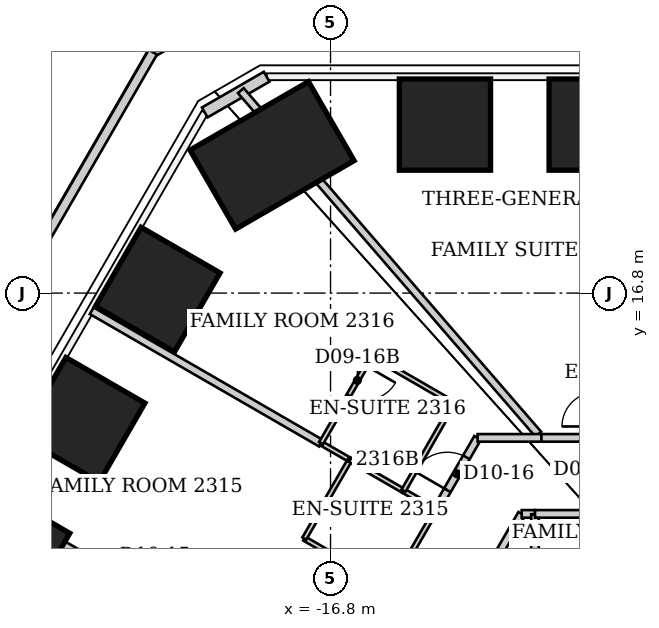
"""IFC4 building model, lengths in metres.
Left out: names, types, materials, properties, quantities, classifications, styles, units other than length and angle.
Written with IfcOpenShell. Run it as: python <this file> out.ifc"""

import sys

from ifc_helpers import new_model, si_unit, direction, frame, frame_2d, origin, origin_2d, place, context, subcontext, project, spatial, rectangle, extrude, clip, halfspace, element, fill, save


model = new_model("IFC4")
c1 = context("Model", 3, precision=1e-05, world=origin(), true_north=direction((0.0, 1.0)))
c2 = subcontext(c1, "Body", "Model", "MODEL_VIEW")
j1 = project(units=[si_unit("LENGTHUNIT", "METRE"), si_unit("PLANEANGLEUNIT", "RADIAN")], contexts=[c1])
p1 = place(None, origin())
s1 = spatial("IfcSite", under=j1, at=p1, CompositionType="ELEMENT")
p2 = place(p1, origin())
s2 = spatial("IfcBuilding", under=s1, at=p2, CompositionType="ELEMENT")
p3 = place(p2, frame((0.0, 0.0, 96.8)))
s3 = spatial("IfcBuildingStorey", under=s2, at=p3, CompositionType="ELEMENT", Elevation=96.8)
p4 = place(p3, frame((-13.79, 21.234, -0.073), z_axis=(0.0, 0.0, 1.0), x_axis=(0.0, 1.0, 0.0)))
e1 = element("IfcColumn", 1, at=p4, inside=s3, PredefinedType="COLUMN", context=c2, shape_type="SweptSolid", body=[
    clip(extrude(rectangle(XDim=2.4, YDim=2.4, at=origin_2d()), origin(), (0.0, 0.0, 1.0), 3.873), halfspace(frame((0.0, 0.0, 0.073)), True)),
])
p5 = place(p3, frame((-9.85, 21.234, -0.064), z_axis=(0.0, 0.0, 1.0), x_axis=(0.0, 1.0, 0.0)))
e2 = element("IfcColumn", 2, at=p5, inside=s3, PredefinedType="COLUMN", context=c2, shape_type="SweptSolid", body=[
    clip(extrude(rectangle(XDim=2.4, YDim=2.4, at=origin_2d()), origin(), (0.0, 0.0, 1.0), 3.865), halfspace(frame((0.0, 0.0, 0.064)), True)),
])
p6 = place(p3, frame((-25.302, 10.041, -0.063), z_axis=(0.0, 0.0, 1.0), x_axis=(-0.866025403784, 0.5, 0.0)))
e3 = element("IfcColumn", 3, at=p6, inside=s3, PredefinedType="COLUMN", context=c2, shape_type="SweptSolid", body=[
    clip(extrude(rectangle(XDim=2.4, YDim=2.4, at=origin_2d()), origin(), (0.0, 0.0, 1.0), 3.863), halfspace(frame((0.0, 0.0, 0.063)), True)),
])
p7 = place(p3, frame((-23.324, 13.466, -0.055), z_axis=(0.0, 0.0, 1.0), x_axis=(-0.866025403784, 0.5, 0.0)))
e4 = element("IfcColumn", 4, at=p7, inside=s3, PredefinedType="COLUMN", context=c2, shape_type="SweptSolid", body=[
    clip(extrude(rectangle(XDim=2.4, YDim=2.4, at=origin_2d()), origin(), (0.0, 0.0, 1.0), 3.855), halfspace(frame((0.0, 0.0, 0.055)), True)),
])
p8 = place(p3, frame((-21.346, 16.891, -0.063), z_axis=(0.0, 0.0, 1.0), x_axis=(-0.866025403784, 0.5, 0.0)))
e5 = element("IfcColumn", 5, at=p8, inside=s3, PredefinedType="COLUMN", context=c2, shape_type="SweptSolid", body=[
    clip(extrude(rectangle(XDim=2.4, YDim=2.4, at=origin_2d()), origin(), (0.0, 0.0, 1.0), 3.863), halfspace(frame((0.0, 0.0, 0.063)), True)),
])
p9 = place(p3, frame((-18.339, 20.424, -0.074), z_axis=(0.0, 0.0, 1.0), x_axis=(-0.5, 0.866025403784, 0.0)))
e6 = element("IfcColumn", 6, at=p9, inside=s3, PredefinedType="COLUMN", context=c2, shape_type="SweptSolid", body=[
    clip(extrude(rectangle(XDim=2.4, YDim=3.6, at=origin_2d()), origin(), (0.0, 0.0, 1.0), 3.874), halfspace(frame((0.0, 0.0, 0.074)), True)),
])
p10 = place(p3, frame((-20.11, 21.554, 0.0), z_axis=(0.0, 0.0, 1.0), x_axis=(0.865988793993, 0.500063404658, 0.0)))
e7 = element("IfcWall", 7, at=p10, inside=s3, PredefinedType="SOLIDWALL", context=c2, shape_type="SweptSolid", body=[
    extrude(rectangle(XDim=1.88, YDim=0.3, at=frame_2d((0.94, 0.0))), origin(), (0.0, 0.0, 1.0), 3.64),
])
p11 = place(p3, frame((-19.75, 24.133, 0.0), z_axis=(0.0, 0.0, 1.0), x_axis=(-0.866479413317, -0.499212806625, 0.0)))
e8 = element("IfcWall", 8, at=p11, inside=s3, PredefinedType="PARAPET", context=c2, shape_type="SweptSolid", body=[
    extrude(rectangle(XDim=1.991, YDim=0.25, at=frame_2d((0.996, 0.0))), origin(), (0.0, 0.0, 1.0), 1.1),
])
p12 = place(p3, frame((-21.475, 23.139, 0.0), z_axis=(0.0, 0.0, 1.0), x_axis=(-0.499999656836, -0.86602560191, 0.0)))
e9 = element("IfcWall", 9, at=p12, inside=s3, PredefinedType="PARAPET", context=c2, shape_type="SweptSolid", body=[
    extrude(rectangle(XDim=18.602, YDim=0.25, at=frame_2d((9.301, 0.0))), origin(), (0.0, 0.0, 1.0), 1.1),
])
p13 = place(p3, frame((-23.084, 16.335, 0.0), z_axis=(0.0, 0.0, 1.0), x_axis=(0.865889693368, -0.500234983702, 0.0)))
e10 = element("IfcWall", 10, at=p13, inside=s3, PredefinedType="PARTITIONING", context=c2, shape_type="SweptSolid", body=[
    extrude(rectangle(XDim=6.968, YDim=0.2, at=frame_2d((3.484, 0.0))), origin(), (0.0, 0.0, 1.0), 3.64),
])
p14 = place(p3, frame((-17.49, 10.34, 0.0), z_axis=(0.0, 0.0, 1.0), x_axis=(0.866114241029, -0.499846097802, 0.0)))
e11 = element("IfcWall", 11, at=p14, inside=s3, PredefinedType="PARTITIONING", context=c2, shape_type="SweptSolid", body=[
    extrude(rectangle(XDim=2.621, YDim=0.12, at=frame_2d((1.311, 0.0))), origin(), (0.0, 0.0, 1.0), 3.64),
])
p15 = place(p14, frame((1.421, 0.0, 0.0)))
e12 = element("IfcOpeningElement", 12, at=p15, cuts=e11, PredefinedType="OPENING", context=c2, shape_type="SweptSolid", body=[
    extrude(rectangle(XDim=0.9, YDim=2.03, at=frame_2d((0.45, 1.015))), frame((0.0, 0.06, 0.0), z_axis=(0.0, -1.0, 0.0), x_axis=(1.0, 0.0, 0.0)), (0.0, 0.0, 1.0), 0.12),
])
p16 = place(p3, frame((-17.051, 12.849, 0.0), z_axis=(0.0, 0.0, 1.0), x_axis=(0.865838315616, -0.500323906295, 0.0)))
e13 = element("IfcWall", 13, at=p16, inside=s3, PredefinedType="PARTITIONING", context=c2, shape_type="SweptSolid", body=[
    extrude(rectangle(XDim=0.878, YDim=0.12, at=frame_2d((0.439, 0.0))), origin(), (0.0, 0.0, 1.0), 3.64),
])
p17 = place(p3, frame((-16.88, 6.16, 0.0), z_axis=(0.0, 0.0, 1.0), x_axis=(-0.86594745947, 0.500134979218, 0.0)))
e14 = element("IfcWall", 14, at=p17, inside=s3, PredefinedType="PARTITIONING", context=c2, shape_type="SweptSolid", body=[
    extrude(rectangle(XDim=10.467, YDim=0.2, at=frame_2d((5.234, 0.0))), origin(), (0.0, 0.0, 1.0), 3.64),
])
p18 = place(p17, frame((4.734, 0.0, 0.0)))
e15 = element("IfcOpeningElement", 15, at=p18, cuts=e14, PredefinedType="OPENING", context=c2, shape_type="SweptSolid", body=[
    extrude(rectangle(XDim=1.0, YDim=2.13, at=frame_2d((0.5, 1.065))), frame((0.0, 0.1, 0.0), z_axis=(0.0, -1.0, 0.0), x_axis=(1.0, 0.0, 0.0)), (0.0, 0.0, 1.0), 0.2),
])
p19 = place(p3, frame((-16.29, 12.41, 0.0), z_axis=(0.0, 0.0, 1.0), x_axis=(-0.501547039172, -0.865130376012, 0.0)))
e16 = element("IfcWall", 16, at=p19, inside=s3, PredefinedType="PARTITIONING", context=c2, shape_type="SweptSolid", body=[
    extrude(rectangle(XDim=2.393, YDim=0.12, at=frame_2d((1.196, 0.0))), origin(), (0.0, 0.0, 1.0), 3.64),
])
p20 = place(p3, frame((-16.29, 12.41, 0.0), z_axis=(0.0, 0.0, 1.0), x_axis=(0.866138091645, -0.499804768086, 0.0)))
e17 = element("IfcWall", 17, at=p20, inside=s3, PredefinedType="PARTITIONING", context=c2, shape_type="SweptSolid", body=[
    extrude(rectangle(XDim=1.626, YDim=0.12, at=frame_2d((0.813, 0.0))), origin(), (0.0, 0.0, 1.0), 3.64),
])
p21 = place(p3, frame((-15.98, 3.7, 0.0), z_axis=(0.0, 0.0, 1.0), x_axis=(0.500093981358, 0.865971136822, 0.0)))
e18 = element("IfcWall", 18, at=p21, inside=s3, PredefinedType="PARTITIONING", context=c2, shape_type="SweptSolid", body=[
    extrude(rectangle(XDim=8.418, YDim=0.2, at=frame_2d((4.209, 0.0))), origin(), (0.0, 0.0, 1.0), 3.64),
])
p22 = place(p3, frame((-15.72, 15.15, 0.0), z_axis=(0.0, 0.0, 1.0), x_axis=(-0.500605174168, -0.865675724273, 0.0)))
e19 = element("IfcWall", 19, at=p22, inside=s3, PredefinedType="PARTITIONING", context=c2, shape_type="SweptSolid", body=[
    extrude(rectangle(XDim=2.657, YDim=0.12, at=frame_2d((1.329, 0.0))), origin(), (0.0, 0.0, 1.0), 3.64),
])
p23 = place(p22, frame((0.3, 0.0, 0.0)))
e20 = element("IfcOpeningElement", 20, at=p23, cuts=e19, PredefinedType="OPENING", context=c2, shape_type="SweptSolid", body=[
    extrude(rectangle(XDim=0.9, YDim=2.03, at=frame_2d((0.45, 1.015))), frame((0.0, 0.06, 0.0), z_axis=(0.0, -1.0, 0.0), x_axis=(1.0, 0.0, 0.0)), (0.0, 0.0, 1.0), 0.12),
])
p24 = place(p3, frame((-15.22, 9.03, 0.0), z_axis=(0.0, 0.0, 1.0), x_axis=(0.501502765098, 0.865156041763, 0.0)))
e21 = element("IfcWall", 21, at=p24, inside=s3, PredefinedType="PARTITIONING", context=c2, shape_type="SweptSolid", body=[
    extrude(rectangle(XDim=2.393, YDim=0.12, at=frame_2d((1.196, 0.0))), origin(), (0.0, 0.0, 1.0), 3.64),
])
p25 = place(p3, frame((-14.882, 11.597, 0.0), z_axis=(0.0, 0.0, 1.0), x_axis=(0.866181499781, -0.499729536286, 0.0)))
e22 = element("IfcWall", 22, at=p25, inside=s3, PredefinedType="PARTITIONING", context=c2, shape_type="SweptSolid", body=[
    extrude(rectangle(XDim=0.995, YDim=0.12, at=frame_2d((0.497, 0.0))), origin(), (0.0, 0.0, 1.0), 3.64),
])
p26 = place(p3, frame((-14.88, 11.6, 0.0), z_axis=(0.0, 0.0, 1.0), x_axis=(0.497704656183, 0.867346571569, 0.0)))
e23 = element("IfcWall", 23, at=p26, inside=s3, PredefinedType="PARTITIONING", context=c2, shape_type="SweptSolid", body=[
    extrude(rectangle(XDim=2.652, YDim=0.12, at=frame_2d((1.326, 0.0))), origin(), (0.0, 0.0, 1.0), 3.64),
])
p27 = place(p3, frame((-14.02, 11.1, 0.0), z_axis=(0.0, 0.0, 1.0), x_axis=(0.499641723021, 0.866232156305, 0.0)))
e24 = element("IfcWall", 24, at=p27, inside=s3, PredefinedType="PARTITIONING", context=c2, shape_type="SweptSolid", body=[
    extrude(rectangle(XDim=2.182, YDim=0.2, at=frame_2d((1.091, 0.0))), origin(), (0.0, 0.0, 1.0), 3.64),
])
p28 = place(p27, frame((0.591, 0.0, 0.0)))
e25 = element("IfcOpeningElement", 25, at=p28, cuts=e24, PredefinedType="OPENING", context=c2, shape_type="SweptSolid", body=[
    extrude(rectangle(XDim=1.0, YDim=2.13, at=frame_2d((0.5, 1.065))), frame((0.0, 0.1, 0.0), z_axis=(0.0, -1.0, 0.0), x_axis=(1.0, 0.0, 0.0)), (0.0, 0.0, 1.0), 0.2),
])
p29 = place(p3, frame((-13.56, 13.9, 0.0), z_axis=(0.0, 0.0, 1.0), x_axis=(-0.865508881864, 0.500893576935, 0.0)))
e26 = element("IfcWall", 26, at=p29, inside=s3, PredefinedType="PARTITIONING", context=c2, shape_type="SweptSolid", body=[
    extrude(rectangle(XDim=2.496, YDim=0.12, at=frame_2d((1.248, 0.0))), origin(), (0.0, 0.0, 1.0), 3.64),
])
p30 = place(p3, frame((-11.77, 10.99, 0.0), z_axis=(0.0, 0.0, 1.0), x_axis=(1.0, 0.0, 0.0)))
e27 = element("IfcWall", 27, at=p30, inside=s3, PredefinedType="PARTITIONING", context=c2, shape_type="SweptSolid", body=[
    extrude(rectangle(XDim=0.35, YDim=0.2, at=frame_2d((0.175, 0.0))), origin(), (0.0, 0.0, 1.0), 3.64),
])
p31 = place(p3, frame((-11.42, 10.98, 0.0), z_axis=(0.0, 0.0, 1.0), x_axis=(0.0, -1.0, 0.0)))
e28 = element("IfcWall", 28, at=p31, inside=s3, PredefinedType="PARTITIONING", context=c2, shape_type="SweptSolid", body=[
    extrude(rectangle(XDim=14.995, YDim=0.2, at=frame_2d((7.498, 0.0))), origin(), (0.0, 0.0, 1.0), 3.64),
])
p32 = place(p3, frame((-11.42, 10.99, 0.0), z_axis=(0.0, 0.0, 1.0), x_axis=(1.0, 0.0, 0.0)))
e29 = element("IfcWall", 29, at=p32, inside=s3, PredefinedType="PARTITIONING", context=c2, shape_type="SweptSolid", body=[
    extrude(rectangle(XDim=4.57, YDim=0.2, at=frame_2d((2.285, 0.0))), origin(), (0.0, 0.0, 1.0), 3.64),
])
p33 = place(p32, frame((1.735, 0.0, 0.0)))
e30 = element("IfcOpeningElement", 30, at=p33, cuts=e29, PredefinedType="OPENING", context=c2, shape_type="SweptSolid", body=[
    extrude(rectangle(XDim=1.1, YDim=2.2, at=frame_2d((0.55, 1.1))), frame((0.0, 0.1, 0.0), z_axis=(0.0, -1.0, 0.0), x_axis=(1.0, 0.0, 0.0)), (0.0, 0.0, 1.0), 0.2),
])
p34 = place(p3, frame((-11.335, 13.088, 0.0), z_axis=(0.0, 0.0, 1.0), x_axis=(-0.654526953183, 0.75603866803, 0.0)))
e31 = element("IfcWall", 31, at=p34, inside=s3, PredefinedType="PARTITIONING", context=c2, shape_type="SweptSolid", body=[
    extrude(rectangle(XDim=11.956, YDim=0.2, at=frame_2d((5.978, 0.0))), origin(), (0.0, 0.0, 1.0), 3.64),
])
p35 = place(p3, frame((-11.25, 12.99, 0.0), z_axis=(0.0, 0.0, 1.0), x_axis=(-1.0, 0.0, 0.0)))
e32 = element("IfcWall", 32, at=p35, inside=s3, PredefinedType="PARTITIONING", context=c2, shape_type="SweptSolid", body=[
    extrude(rectangle(XDim=1.68, YDim=0.2, at=frame_2d((0.84, 0.0))), origin(), (0.0, 0.0, 1.0), 3.64),
])
p36 = place(p3, frame((-9.81, 12.99, 0.0), z_axis=(0.0, 0.0, 1.0), x_axis=(-1.0, 0.0, 0.0)))
e33 = element("IfcWall", 33, at=p36, inside=s3, PredefinedType="PARTITIONING", context=c2, shape_type="SweptSolid", body=[
    extrude(rectangle(XDim=1.44, YDim=0.2, at=frame_2d((0.72, 0.0))), origin(), (0.0, 0.0, 1.0), 3.64),
])
p37 = place(p28, origin())
e34 = element("IfcDoor", 34, at=p37, inside=s3, OperationType="SINGLE_SWING_LEFT", PredefinedType="DOOR", context=c2, shape_type="SweptSolid", body=[
    extrude(rectangle(XDim=1.0, YDim=2.13, at=frame_2d((0.5, 1.065))), frame((0.0, 0.025, 0.0), z_axis=(0.0, -1.0, 0.0), x_axis=(1.0, 0.0, 0.0)), (0.0, 0.0, 1.0), 0.05),
])
fill(e25, e34)
p38 = place(p23, origin())
e35 = element("IfcDoor", 35, at=p38, inside=s3, OperationType="SINGLE_SWING_LEFT", PredefinedType="DOOR", context=c2, shape_type="SweptSolid", body=[
    extrude(rectangle(XDim=0.9, YDim=2.03, at=frame_2d((0.45, 1.015))), frame((0.0, 0.025, 0.0), z_axis=(0.0, -1.0, 0.0), x_axis=(1.0, 0.0, 0.0)), (0.0, 0.0, 1.0), 0.05),
])
fill(e20, e35)
save(model, sys.argv[1])
